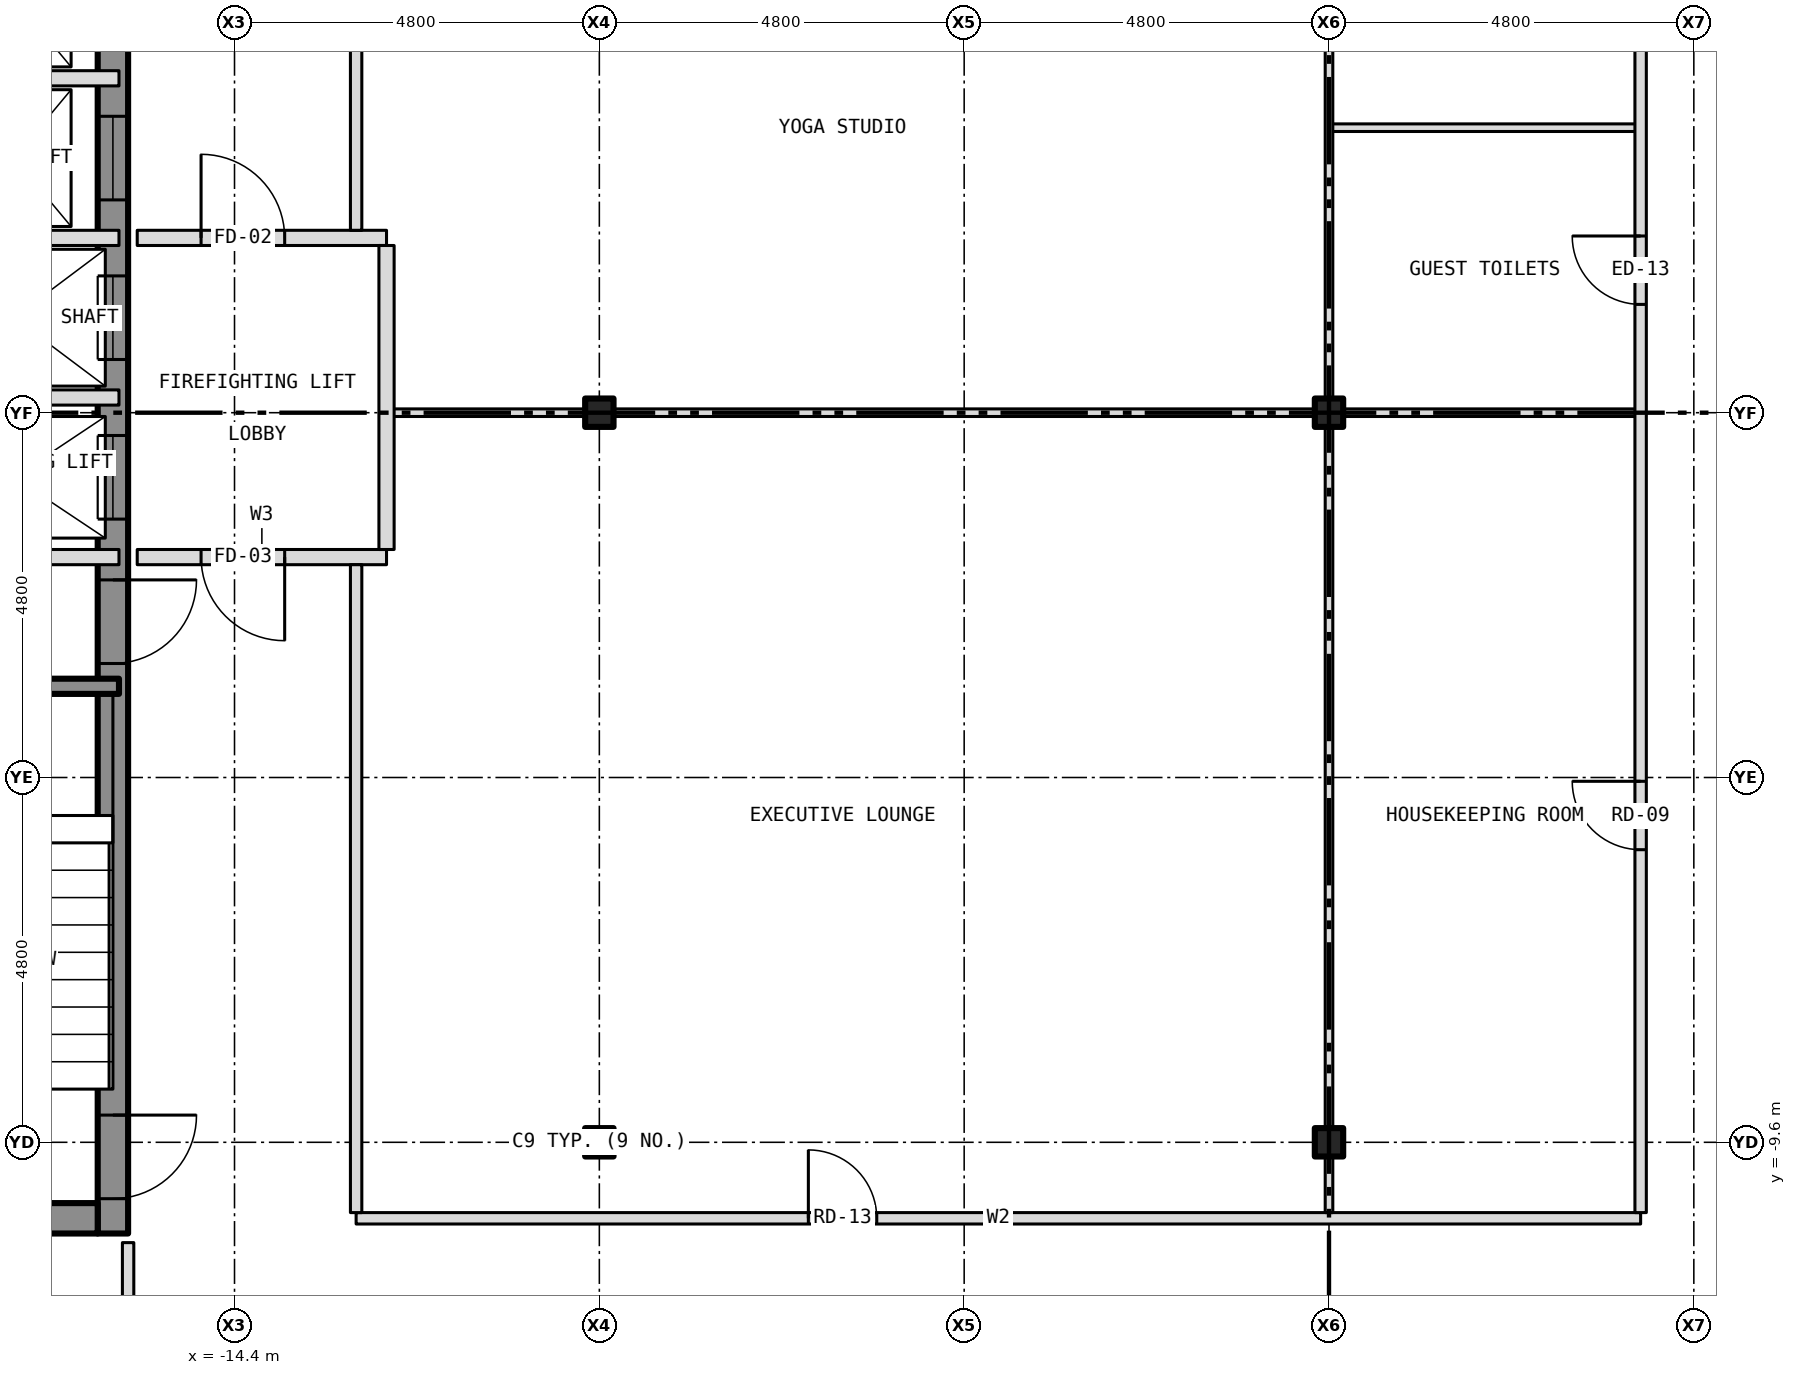
"""IFC4 building model, lengths in metres.
Left out: names, types, materials, properties, quantities, classifications, styles, units other than length and angle.
Written with IfcOpenShell. Run it as: python <this file> out.ifc"""

import sys

from ifc_helpers import new_model, si_unit, direction, frame, frame_2d, origin, origin_2d, place, context, subcontext, project, spatial, rectangle, i_section, extrude, element, fill, save


model = new_model("IFC4")
c1 = context("Model", 3, precision=1e-05, world=origin(), true_north=direction((0.0, 1.0)))
c2 = subcontext(c1, "Body", "Model", "MODEL_VIEW")
j1 = project(units=[si_unit("LENGTHUNIT", "METRE"), si_unit("PLANEANGLEUNIT", "RADIAN")], contexts=[c1])
p1 = place(None, origin())
s1 = spatial("IfcSite", under=j1, at=p1, CompositionType="ELEMENT")
p2 = place(p1, origin())
s2 = spatial("IfcBuilding", under=s1, at=p2, CompositionType="ELEMENT")
p3 = place(p2, frame((0.0, 0.0, 205.0)))
s3 = spatial("IfcBuildingStorey", under=s2, at=p3, CompositionType="ELEMENT", Elevation=205.0)
for number, where, z_axis, x_axis in (
    (1, (-9.6, -9.6, -0.15), (0.0, 0.0, 1.0), (1.0, 0.0, 0.0)),
    (2, (-9.6, 0.0, -0.15), (0.0, 0.0, 1.0), (1.0, 0.0, 0.0)),
    (3, (0.0, -9.6, -0.15), (0.0, 0.0, 1.0), (1.0, 0.0, 0.0)),
    (4, (0.0, 0.0, -0.15), (0.0, 0.0, 1.0), (1.0, 0.0, 0.0)),
):
    element("IfcColumn", number, at=place(p3, frame(where, z_axis=z_axis, x_axis=x_axis)), inside=s3, PredefinedType="COLUMN", context=c2, shape_type="SweptSolid", body=[
        extrude(i_section(OverallWidth=0.373, OverallDepth=0.373, WebThickness=0.016, FlangeThickness=0.026, at=origin_2d()), origin(), (0.0, 0.0, 1.0), 3.5),
    ])
p4 = place(p3, frame((-16.0, -10.8, 0.0), z_axis=(0.0, 0.0, 1.0), x_axis=(0.0, 1.0, 0.0)))
e5 = element("IfcWall", 5, at=p4, inside=s3, PredefinedType="SHEAR", context=c2, shape_type="SweptSolid", body=[
    extrude(rectangle(XDim=21.6, YDim=0.4, at=frame_2d((10.8, 0.0))), origin(), (0.0, 0.0, 1.0), 3.25),
])
p5 = place(p4, frame((9.4, 0.0, 0.0)))
e6 = element("IfcOpeningElement", 6, at=p5, cuts=e5, PredefinedType="OPENING", context=c2, shape_type="SweptSolid", body=[
    extrude(rectangle(XDim=1.1, YDim=2.1, at=frame_2d((0.55, 1.05))), frame((0.0, 0.212, 0.0), z_axis=(0.0, -1.0, 0.0), x_axis=(1.0, 0.0, 0.0)), (0.0, 0.0, 1.0), 0.424),
])
p6 = place(p4, frame((11.5, 0.0, 0.0)))
e7 = element("IfcOpeningElement", 7, at=p6, cuts=e5, PredefinedType="OPENING", context=c2, shape_type="SweptSolid", body=[
    extrude(rectangle(XDim=1.1, YDim=2.1, at=frame_2d((0.55, 1.05))), frame((0.0, 0.212, 0.0), z_axis=(0.0, -1.0, 0.0), x_axis=(1.0, 0.0, 0.0)), (0.0, 0.0, 1.0), 0.424),
])
p7 = place(p4, frame((13.6, 0.0, 0.0)))
e8 = element("IfcOpeningElement", 8, at=p7, cuts=e5, PredefinedType="OPENING", context=c2, shape_type="SweptSolid", body=[
    extrude(rectangle(XDim=1.1, YDim=2.1, at=frame_2d((0.55, 1.05))), frame((0.0, 0.212, 0.0), z_axis=(0.0, -1.0, 0.0), x_axis=(1.0, 0.0, 0.0)), (0.0, 0.0, 1.0), 0.424),
])
p8 = place(p4, frame((15.7, 0.0, 0.0)))
e9 = element("IfcOpeningElement", 9, at=p8, cuts=e5, PredefinedType="OPENING", context=c2, shape_type="SweptSolid", body=[
    extrude(rectangle(XDim=1.1, YDim=2.1, at=frame_2d((0.55, 1.05))), frame((0.0, 0.212, 0.0), z_axis=(0.0, -1.0, 0.0), x_axis=(1.0, 0.0, 0.0)), (0.0, 0.0, 1.0), 0.424),
])
p9 = place(p4, frame((17.8, 0.0, 0.0)))
e10 = element("IfcOpeningElement", 10, at=p9, cuts=e5, PredefinedType="OPENING", context=c2, shape_type="SweptSolid", body=[
    extrude(rectangle(XDim=1.1, YDim=2.1, at=frame_2d((0.55, 1.05))), frame((0.0, 0.212, 0.0), z_axis=(0.0, -1.0, 0.0), x_axis=(1.0, 0.0, 0.0)), (0.0, 0.0, 1.0), 0.424),
])
p10 = place(p4, frame((0.458, 0.0, 0.0)))
e11 = element("IfcOpeningElement", 11, at=p10, cuts=e5, PredefinedType="OPENING", context=c2, shape_type="SweptSolid", body=[
    extrude(rectangle(XDim=1.1, YDim=2.1, at=frame_2d((0.55, 1.05))), frame((0.0, 0.212, 0.0), z_axis=(0.0, -1.0, 0.0), x_axis=(1.0, 0.0, 0.0)), (0.0, 0.0, 1.0), 0.424),
])
p11 = place(p4, frame((7.5, 0.0, 0.0)))
e12 = element("IfcOpeningElement", 12, at=p11, cuts=e5, PredefinedType="OPENING", context=c2, shape_type="SweptSolid", body=[
    extrude(rectangle(XDim=1.1, YDim=2.1, at=frame_2d((0.55, 1.05))), frame((0.0, 0.212, 0.0), z_axis=(0.0, -1.0, 0.0), x_axis=(1.0, 0.0, 0.0)), (0.0, 0.0, 1.0), 0.424),
])
p12 = place(p4, frame((20.0, 0.0, 0.0)))
e13 = element("IfcOpeningElement", 13, at=p12, cuts=e5, PredefinedType="OPENING", context=c2, shape_type="SweptSolid", body=[
    extrude(rectangle(XDim=0.9, YDim=2.1, at=frame_2d((0.45, 1.05))), frame((0.0, 0.212, 0.0), z_axis=(0.0, -1.0, 0.0), x_axis=(1.0, 0.0, 0.0)), (0.0, 0.0, 1.0), 0.424),
])
p13 = place(p3, frame((-20.0, -10.6, 0.0), z_axis=(0.0, 0.0, 1.0), x_axis=(1.0, 0.0, 0.0)))
e14 = element("IfcWall", 14, at=p13, inside=s3, PredefinedType="SHEAR", context=c2, shape_type="SweptSolid", body=[
    extrude(rectangle(XDim=3.8, YDim=0.4, at=frame_2d((1.9, 0.0))), origin(), (0.0, 0.0, 1.0), 3.25),
])
p14 = place(p3, frame((-12.8, -10.6, 0.0), z_axis=(0.0, 0.0, 1.0), x_axis=(1.0, 0.0, 0.0)))
e15 = element("IfcWall", 15, at=p14, inside=s3, PredefinedType="PARTITIONING", context=c2, shape_type="SweptSolid", body=[
    extrude(rectangle(XDim=16.9, YDim=0.15, at=frame_2d((8.45, 0.0))), origin(), (0.0, 0.0, 1.0), 3.35),
])
p15 = place(p14, frame((5.95, 0.0, 0.0)))
e16 = element("IfcOpeningElement", 16, at=p15, cuts=e15, PredefinedType="OPENING", context=c2, shape_type="SweptSolid", body=[
    extrude(rectangle(XDim=0.9, YDim=2.1, at=frame_2d((0.45, 1.05))), frame((0.0, 0.087, 0.0), z_axis=(0.0, -1.0, 0.0), x_axis=(1.0, 0.0, 0.0)), (0.0, 0.0, 1.0), 0.174),
])
p16 = place(p3, frame((-20.28, -3.6, 0.0), z_axis=(0.0, 0.0, 1.0), x_axis=(1.0, 0.0, 0.0)))
e17 = element("IfcWall", 17, at=p16, inside=s3, PredefinedType="SHEAR", context=c2, shape_type="SweptSolid", body=[
    extrude(rectangle(XDim=4.36, YDim=0.2, at=frame_2d((2.18, 0.0))), origin(), (0.0, 0.0, 1.0), 3.25),
])
p17 = place(p3, frame((-20.28, -1.9, 0.0), z_axis=(0.0, 0.0, 1.0), x_axis=(1.0, 0.0, 0.0)))
e18 = element("IfcWall", 18, at=p17, inside=s3, PredefinedType="PARTITIONING", context=c2, shape_type="SweptSolid", body=[
    extrude(rectangle(XDim=4.36, YDim=0.2, at=frame_2d((2.18, 0.0))), origin(), (0.0, 0.0, 1.0), 3.25),
])
p18 = place(p17, frame((0.28, 0.0, 0.0)))
e19 = element("IfcOpeningElement", 19, at=p18, cuts=e18, PredefinedType="OPENING", context=c2, shape_type="SweptSolid", body=[
    extrude(rectangle(XDim=0.9, YDim=2.1, at=frame_2d((0.45, 1.05))), frame((0.0, 0.112, 0.0), z_axis=(0.0, -1.0, 0.0), x_axis=(1.0, 0.0, 0.0)), (0.0, 0.0, 1.0), 0.224),
])
p19 = place(p3, frame((-15.68, -1.9, 0.0), z_axis=(0.0, 0.0, 1.0), x_axis=(1.0, 0.0, 0.0)))
e20 = element("IfcWall", 20, at=p19, inside=s3, PredefinedType="PARTITIONING", context=c2, shape_type="SweptSolid", body=[
    extrude(rectangle(XDim=3.28, YDim=0.2, at=frame_2d((1.64, 0.0))), origin(), (0.0, 0.0, 1.0), 3.35),
])
p20 = place(p19, frame((0.84, 0.0, 0.0)))
e21 = element("IfcOpeningElement", 21, at=p20, cuts=e20, PredefinedType="OPENING", context=c2, shape_type="SweptSolid", body=[
    extrude(rectangle(XDim=1.1, YDim=2.1, at=frame_2d((0.55, 1.05))), frame((0.0, 0.112, 0.0), z_axis=(0.0, -1.0, 0.0), x_axis=(1.0, 0.0, 0.0)), (0.0, 0.0, 1.0), 0.224),
])
p21 = place(p3, frame((-12.4, 0.0, 0.0), z_axis=(0.0, 0.0, 1.0), x_axis=(1.0, 0.0, 0.0)))
e22 = element("IfcWall", 22, at=p21, inside=s3, PredefinedType="PARTITIONING", context=c2, shape_type="SweptSolid", body=[
    extrude(rectangle(XDim=2.613, YDim=0.1, at=frame_2d((1.306, 0.0))), origin(), (0.0, 0.0, 1.0), 2.728),
])
p22 = place(p3, frame((-9.787, 0.0, 0.0), z_axis=(0.0, 0.0, 1.0), x_axis=(1.0, 0.0, 0.0)))
e23 = element("IfcWall", 23, at=p22, inside=s3, PredefinedType="PARTITIONING", context=c2, shape_type="SweptSolid", body=[
    extrude(rectangle(XDim=0.374, YDim=0.1, at=frame_2d((0.187, 0.0))), origin(), (0.0, 0.0, 1.0), 3.35),
])
p23 = place(p3, frame((-9.413, 0.0, 0.0), z_axis=(0.0, 0.0, 1.0), x_axis=(1.0, 0.0, 0.0)))
e24 = element("IfcWall", 24, at=p23, inside=s3, PredefinedType="PARTITIONING", context=c2, shape_type="SweptSolid", body=[
    extrude(rectangle(XDim=9.226, YDim=0.1, at=frame_2d((4.613, 0.0))), origin(), (0.0, 0.0, 1.0), 2.728),
])
p24 = place(p3, frame((-0.187, 0.0, 0.0), z_axis=(0.0, 0.0, 1.0), x_axis=(1.0, 0.0, 0.0)))
e25 = element("IfcWall", 25, at=p24, inside=s3, PredefinedType="PARTITIONING", context=c2, shape_type="SweptSolid", body=[
    extrude(rectangle(XDim=0.374, YDim=0.1, at=frame_2d((0.187, 0.0))), origin(), (0.0, 0.0, 1.0), 3.35),
])
p25 = place(p3, frame((0.187, 0.0, 0.0), z_axis=(0.0, 0.0, 1.0), x_axis=(1.0, 0.0, 0.0)))
e26 = element("IfcWall", 26, at=p25, inside=s3, PredefinedType="PARTITIONING", context=c2, shape_type="SweptSolid", body=[
    extrude(rectangle(XDim=3.913, YDim=0.1, at=frame_2d((1.957, 0.0))), origin(), (0.0, 0.0, 1.0), 2.728),
])
for number, where, z_axis, x_axis in (
    (27, (-18.8, 0.2, 0.0), (0.0, 0.0, 1.0), (1.0, 0.0, 0.0)),
    (28, (-18.8, 2.3, 0.0), (0.0, 0.0, 1.0), (1.0, 0.0, 0.0)),
):
    element("IfcWall", number, at=place(p3, frame(where, z_axis=z_axis, x_axis=x_axis)), inside=s3, PredefinedType="PARTITIONING", context=c2, shape_type="SweptSolid", body=[
        extrude(rectangle(XDim=2.88, YDim=0.2, at=frame_2d((1.44, 0.0))), origin(), (0.0, 0.0, 1.0), 3.25),
    ])
p26 = place(p3, frame((-15.68, 2.3, 0.0), z_axis=(0.0, 0.0, 1.0), x_axis=(1.0, 0.0, 0.0)))
e29 = element("IfcWall", 29, at=p26, inside=s3, PredefinedType="PARTITIONING", context=c2, shape_type="SweptSolid", body=[
    extrude(rectangle(XDim=3.28, YDim=0.2, at=frame_2d((1.64, 0.0))), origin(), (0.0, 0.0, 1.0), 3.35),
])
p27 = place(p26, frame((0.84, 0.0, 0.0)))
e30 = element("IfcOpeningElement", 30, at=p27, cuts=e29, PredefinedType="OPENING", context=c2, shape_type="SweptSolid", body=[
    extrude(rectangle(XDim=1.1, YDim=2.1, at=frame_2d((0.55, 1.05))), frame((0.0, 0.112, 0.0), z_axis=(0.0, -1.0, 0.0), x_axis=(1.0, 0.0, 0.0)), (0.0, 0.0, 1.0), 0.224),
])
p28 = place(p3, frame((0.0, 3.75, 0.0), z_axis=(0.0, 0.0, 1.0), x_axis=(1.0, 0.0, 0.0)))
e31 = element("IfcWall", 31, at=p28, inside=s3, PredefinedType="PARTITIONING", context=c2, shape_type="SweptSolid", body=[
    extrude(rectangle(XDim=4.1, YDim=0.1, at=frame_2d((2.05, 0.0))), origin(), (0.0, 0.0, 1.0), 3.35),
])
p29 = place(p3, frame((-18.8, 4.4, 0.0), z_axis=(0.0, 0.0, 1.0), x_axis=(1.0, 0.0, 0.0)))
e32 = element("IfcWall", 32, at=p29, inside=s3, PredefinedType="PARTITIONING", context=c2, shape_type="SweptSolid", body=[
    extrude(rectangle(XDim=2.88, YDim=0.2, at=frame_2d((1.44, 0.0))), origin(), (0.0, 0.0, 1.0), 3.25),
])
p30 = place(p3, frame((-15.8, -12.725, 0.0), z_axis=(0.0, 0.0, 1.0), x_axis=(0.0, 1.0, 0.0)))
e33 = element("IfcWall", 33, at=p30, inside=s3, PredefinedType="PARTITIONING", context=c2, shape_type="SweptSolid", body=[
    extrude(rectangle(XDim=1.805, YDim=0.15, at=frame_2d((0.903, 0.0))), origin(), (0.0, 0.0, 1.0), 3.35),
])
p31 = place(p3, frame((-12.8, -10.525, 0.0), z_axis=(0.0, 0.0, 1.0), x_axis=(0.0, 1.0, 0.0)))
e34 = element("IfcWall", 34, at=p31, inside=s3, PredefinedType="PARTITIONING", context=c2, shape_type="SweptSolid", body=[
    extrude(rectangle(XDim=8.525, YDim=0.15, at=frame_2d((4.262, 0.0))), origin(), (0.0, 0.0, 1.0), 3.35),
])
p32 = place(p3, frame((-12.8, 2.4, 0.0), z_axis=(0.0, 0.0, 1.0), x_axis=(0.0, 1.0, 0.0)))
e35 = element("IfcWall", 35, at=p32, inside=s3, PredefinedType="PARTITIONING", context=c2, shape_type="SweptSolid", body=[
    extrude(rectangle(XDim=5.05, YDim=0.15, at=frame_2d((2.525, 0.0))), origin(), (0.0, 0.0, 1.0), 3.35),
])
p33 = place(p3, frame((-12.4, -1.8, 0.0), z_axis=(0.0, 0.0, 1.0), x_axis=(0.0, 1.0, 0.0)))
e36 = element("IfcWall", 36, at=p33, inside=s3, PredefinedType="PARTITIONING", context=c2, shape_type="SweptSolid", body=[
    extrude(rectangle(XDim=4.0, YDim=0.2, at=frame_2d((2.0, 0.0))), origin(), (0.0, 0.0, 1.0), 3.35),
])
p34 = place(p3, frame((0.0, -10.525, 0.0), z_axis=(0.0, 0.0, 1.0), x_axis=(0.0, 1.0, 0.0)))
e37 = element("IfcWall", 37, at=p34, inside=s3, PredefinedType="PARTITIONING", context=c2, shape_type="SweptSolid", body=[
    extrude(rectangle(XDim=0.738, YDim=0.1, at=frame_2d((0.369, 0.0))), origin(), (0.0, 0.0, 1.0), 2.728),
])
p35 = place(p3, frame((0.0, -9.787, 0.0), z_axis=(0.0, 0.0, 1.0), x_axis=(0.0, 1.0, 0.0)))
e38 = element("IfcWall", 38, at=p35, inside=s3, PredefinedType="PARTITIONING", context=c2, shape_type="SweptSolid", body=[
    extrude(rectangle(XDim=0.374, YDim=0.1, at=frame_2d((0.187, 0.0))), origin(), (0.0, 0.0, 1.0), 3.35),
])
p36 = place(p3, frame((0.0, -9.413, 0.0), z_axis=(0.0, 0.0, 1.0), x_axis=(0.0, 1.0, 0.0)))
e39 = element("IfcWall", 39, at=p36, inside=s3, PredefinedType="PARTITIONING", context=c2, shape_type="SweptSolid", body=[
    extrude(rectangle(XDim=9.363, YDim=0.1, at=frame_2d((4.682, 0.0))), origin(), (0.0, 0.0, 1.0), 2.728),
])
p37 = place(p3, frame((0.0, 0.05, 0.0), z_axis=(0.0, 0.0, 1.0), x_axis=(0.0, 1.0, 0.0)))
e40 = element("IfcWall", 40, at=p37, inside=s3, PredefinedType="PARTITIONING", context=c2, shape_type="SweptSolid", body=[
    extrude(rectangle(XDim=7.375, YDim=0.1, at=frame_2d((3.688, 0.0))), origin(), (0.0, 0.0, 1.0), 2.728),
])
p38 = place(p3, frame((4.1, -10.525, 0.0), z_axis=(0.0, 0.0, 1.0), x_axis=(0.0, 1.0, 0.0)))
e41 = element("IfcWall", 41, at=p38, inside=s3, PredefinedType="PARTITIONING", context=c2, shape_type="SweptSolid", body=[
    extrude(rectangle(XDim=17.95, YDim=0.15, at=frame_2d((8.975, 0.0))), origin(), (0.0, 0.0, 1.0), 3.35),
])
p39 = place(p38, frame((11.95, 0.0, 0.0)))
e42 = element("IfcOpeningElement", 42, at=p39, cuts=e41, PredefinedType="OPENING", context=c2, shape_type="SweptSolid", body=[
    extrude(rectangle(XDim=0.9, YDim=2.1, at=frame_2d((0.45, 1.05))), frame((0.0, 0.087, 0.0), z_axis=(0.0, -1.0, 0.0), x_axis=(1.0, 0.0, 0.0)), (0.0, 0.0, 1.0), 0.174),
])
p40 = place(p38, frame((4.775, 0.0, 0.0)))
e43 = element("IfcOpeningElement", 43, at=p40, cuts=e41, PredefinedType="OPENING", context=c2, shape_type="SweptSolid", body=[
    extrude(rectangle(XDim=0.9, YDim=2.1, at=frame_2d((0.45, 1.05))), frame((0.0, 0.087, 0.0), z_axis=(0.0, -1.0, 0.0), x_axis=(1.0, 0.0, 0.0)), (0.0, 0.0, 1.0), 0.174),
])
p41 = place(p5, origin())
e44 = element("IfcDoor", 44, at=p41, inside=s3, OperationType="SLIDING_TO_LEFT", PredefinedType="DOOR", context=c2, shape_type="SweptSolid", body=[
    extrude(rectangle(XDim=1.1, YDim=2.1, at=frame_2d((0.55, 1.05))), frame((0.0, 0.025, 0.0), z_axis=(0.0, -1.0, 0.0), x_axis=(1.0, 0.0, 0.0)), (0.0, 0.0, 1.0), 0.05),
])
fill(e6, e44)
p42 = place(p6, origin())
e45 = element("IfcDoor", 45, at=p42, inside=s3, OperationType="SLIDING_TO_LEFT", PredefinedType="DOOR", context=c2, shape_type="SweptSolid", body=[
    extrude(rectangle(XDim=1.1, YDim=2.1, at=frame_2d((0.55, 1.05))), frame((0.0, 0.025, 0.0), z_axis=(0.0, -1.0, 0.0), x_axis=(1.0, 0.0, 0.0)), (0.0, 0.0, 1.0), 0.05),
])
fill(e7, e45)
p43 = place(p7, origin())
e46 = element("IfcDoor", 46, at=p43, inside=s3, OperationType="SLIDING_TO_LEFT", PredefinedType="DOOR", context=c2, shape_type="SweptSolid", body=[
    extrude(rectangle(XDim=1.1, YDim=2.1, at=frame_2d((0.55, 1.05))), frame((0.0, 0.025, 0.0), z_axis=(0.0, -1.0, 0.0), x_axis=(1.0, 0.0, 0.0)), (0.0, 0.0, 1.0), 0.05),
])
fill(e8, e46)
p44 = place(p10, origin())
e47 = element("IfcDoor", 47, at=p44, inside=s3, OperationType="SINGLE_SWING_RIGHT", PredefinedType="DOOR", context=c2, shape_type="SweptSolid", body=[
    extrude(rectangle(XDim=1.1, YDim=2.1, at=frame_2d((0.55, 1.05))), frame((0.0, 0.025, 0.0), z_axis=(0.0, -1.0, 0.0), x_axis=(1.0, 0.0, 0.0)), (0.0, 0.0, 1.0), 0.05),
])
fill(e11, e47)
p45 = place(p11, origin())
e48 = element("IfcDoor", 48, at=p45, inside=s3, OperationType="SINGLE_SWING_RIGHT", PredefinedType="DOOR", context=c2, shape_type="SweptSolid", body=[
    extrude(rectangle(XDim=1.1, YDim=2.1, at=frame_2d((0.55, 1.05))), frame((0.0, 0.025, 0.0), z_axis=(0.0, -1.0, 0.0), x_axis=(1.0, 0.0, 0.0)), (0.0, 0.0, 1.0), 0.05),
])
fill(e12, e48)
p46 = place(p27, origin())
e49 = element("IfcDoor", 49, at=p46, inside=s3, OperationType="SINGLE_SWING_LEFT", PredefinedType="DOOR", context=c2, shape_type="SweptSolid", body=[
    extrude(rectangle(XDim=1.1, YDim=2.1, at=frame_2d((0.55, 1.05))), frame((0.0, 0.025, 0.0), z_axis=(0.0, -1.0, 0.0), x_axis=(1.0, 0.0, 0.0)), (0.0, 0.0, 1.0), 0.05),
])
fill(e30, e49)
p47 = place(p20, origin())
e50 = element("IfcDoor", 50, at=p47, inside=s3, OperationType="SINGLE_SWING_RIGHT", PredefinedType="DOOR", context=c2, shape_type="SweptSolid", body=[
    extrude(rectangle(XDim=1.1, YDim=2.1, at=frame_2d((0.55, 1.05))), frame((0.0, 0.025, 0.0), z_axis=(0.0, -1.0, 0.0), x_axis=(1.0, 0.0, 0.0)), (0.0, 0.0, 1.0), 0.05),
])
fill(e21, e50)
p48 = place(p39, origin())
e51 = element("IfcDoor", 51, at=p48, inside=s3, OperationType="SINGLE_SWING_RIGHT", PredefinedType="DOOR", context=c2, shape_type="SweptSolid", body=[
    extrude(rectangle(XDim=0.9, YDim=2.1, at=frame_2d((0.45, 1.05))), frame((0.0, 0.025, 0.0), z_axis=(0.0, -1.0, 0.0), x_axis=(1.0, 0.0, 0.0)), (0.0, 0.0, 1.0), 0.05),
])
fill(e42, e51)
p49 = place(p40, origin())
e52 = element("IfcDoor", 52, at=p49, inside=s3, OperationType="SINGLE_SWING_RIGHT", PredefinedType="DOOR", context=c2, shape_type="SweptSolid", body=[
    extrude(rectangle(XDim=0.9, YDim=2.1, at=frame_2d((0.45, 1.05))), frame((0.0, 0.025, 0.0), z_axis=(0.0, -1.0, 0.0), x_axis=(1.0, 0.0, 0.0)), (0.0, 0.0, 1.0), 0.05),
])
fill(e43, e52)
p50 = place(p15, origin())
e53 = element("IfcDoor", 53, at=p50, inside=s3, OperationType="SINGLE_SWING_LEFT", PredefinedType="DOOR", context=c2, shape_type="SweptSolid", body=[
    extrude(rectangle(XDim=0.9, YDim=2.1, at=frame_2d((0.45, 1.05))), frame((0.0, 0.025, 0.0), z_axis=(0.0, -1.0, 0.0), x_axis=(1.0, 0.0, 0.0)), (0.0, 0.0, 1.0), 0.05),
])
fill(e16, e53)
save(model, sys.argv[1])
